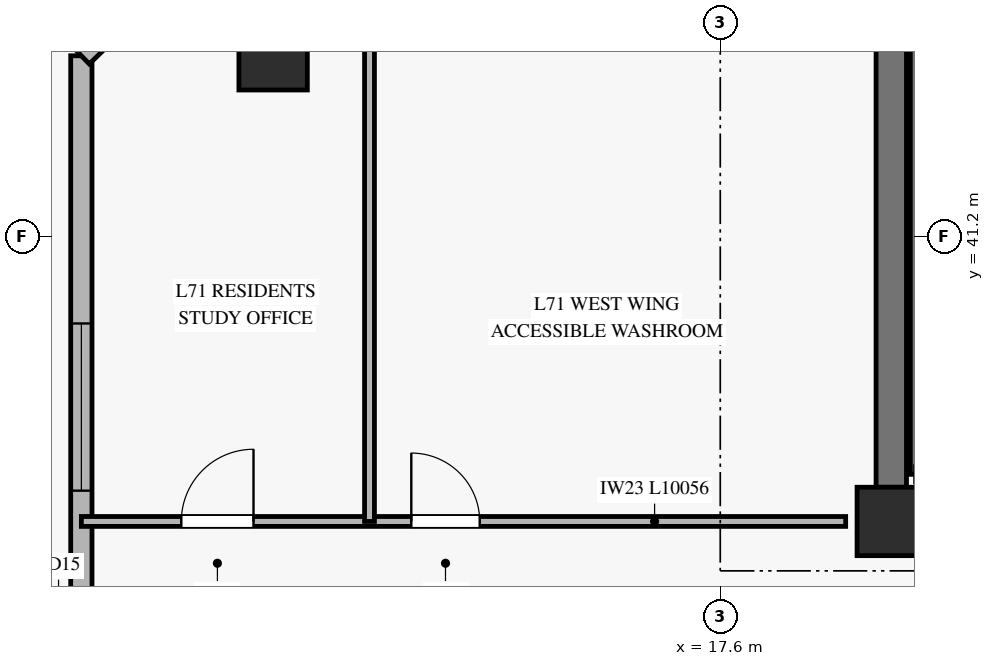
"""IFC4 building model, lengths in metres.
Left out: names, types, materials, properties, quantities, classifications, styles, units other than length and angle.
Written with IfcOpenShell. Run it as: python <this file> out.ifc"""

import sys

from ifc_helpers import new_model, si_unit, direction, frame, frame_2d, origin, origin_2d, place, context, subcontext, project, spatial, rectangle, hollow_rectangle, extrude, source, transform, mapped, element, fill, save


model = new_model("IFC4")
c1 = context("Model", 3, precision=1e-05, world=origin(), true_north=direction((0.0, 1.0)))
c2 = subcontext(c1, "Body", "Model", "MODEL_VIEW")
j1 = project(units=[si_unit("LENGTHUNIT", "METRE"), si_unit("PLANEANGLEUNIT", "RADIAN")], contexts=[c1])
p1 = place(None, origin())
s1 = spatial("IfcSite", under=j1, at=p1, CompositionType="ELEMENT")
p2 = place(p1, origin())
s2 = spatial("IfcBuilding", under=s1, at=p2, CompositionType="ELEMENT")
p3 = place(p2, frame((0.0, 0.0, 275.7)))
s3 = spatial("IfcBuildingStorey", under=s2, at=p3, CompositionType="ELEMENT", Elevation=275.7)
m1 = source(origin(), c2, "Body", "SweptSolid", [
    extrude(rectangle(XDim=0.9, YDim=0.9, at=origin_2d()), origin(), (0.0, 0.0, 1.0), 3.14),
])
p4 = place(p3, frame((19.85, 37.45, 0.0), z_axis=(0.0, 0.0, 1.0), x_axis=(1.0, 0.0, 0.0)))
e1 = element("IfcColumn", 1, at=p4, inside=s3, PredefinedType="PILASTER", context=c2, shape_type="MappedRepresentation", body=[
    mapped(m1, transform((0.0, 0.0, 0.0), x_axis=(1.0, 0.0, 0.0), y_axis=(0.0, 1.0, 0.0), z_axis=(0.0, 0.0, 1.0), scale=1.0)),
])
p5 = place(p3, frame((19.85, 37.9, 0.0), z_axis=(0.0, 0.0, 1.0), x_axis=(0.0, 1.0, 0.0)))
e2 = element("IfcWall", 2, at=p5, inside=s3, PredefinedType="SHEAR", context=c2, shape_type="SweptSolid", body=[
    extrude(rectangle(XDim=8.2, YDim=0.4, at=frame_2d((4.1, 0.0))), origin(), (0.0, 0.0, 1.0), 3.14),
])
m2 = source(origin(), c2, "Body", "SweptSolid", [
    extrude(hollow_rectangle(XDim=0.9, YDim=0.9, WallThickness=0.04, at=origin_2d()), origin(), (0.0, 0.0, 1.0), 3.162),
])
p6 = place(p3, frame((11.717, 43.577, 0.0), z_axis=(0.1166635759, 0.01428376012, 0.993068771161), x_axis=(-0.121527982197, 0.992588005944, 0.0)))
e3 = element("IfcColumn", 3, at=p6, inside=s3, PredefinedType="COLUMN", context=c2, shape_type="MappedRepresentation", body=[
    mapped(m2, transform((0.0, 0.0, 0.0), x_axis=(1.0, 0.0, 0.0), y_axis=(0.0, 1.0, 0.0), z_axis=(0.0, 0.0, 1.0), scale=1.0)),
])
p7 = place(p3, frame((9.194, 31.763, 0.0), z_axis=(0.0, 0.0, 1.0), x_axis=(0.0, 1.0, 0.0)))
e4 = element("IfcWall", 4, at=p7, inside=s3, PredefinedType="SOLIDWALL", context=c2, shape_type="SweptSolid", body=[
    extrude(rectangle(XDim=11.814, YDim=0.28, at=frame_2d((5.907, 0.0))), origin(), (0.0, 0.0, 1.0), 2.77),
])
p8 = place(p7, frame((6.092, 0.0, 0.45)))
e5 = element("IfcOpeningElement", 5, at=p8, cuts=e4, PredefinedType="OPENING", context=c2, shape_type="SweptSolid", body=[
    extrude(rectangle(XDim=2.2, YDim=2.1, at=frame_2d((1.1, 1.05))), frame((0.0, 0.15, 0.0), z_axis=(0.0, -1.0, 0.0), x_axis=(1.0, 0.0, 0.0)), (0.0, 0.0, 1.0), 0.3),
])
p9 = place(p3, frame((11.942, 46.25, 0.0), z_axis=(0.0, 0.0, 1.0), x_axis=(-0.716783568283, -0.697295716493, 0.0)))
e6 = element("IfcWall", 6, at=p9, inside=s3, PredefinedType="SOLIDWALL", context=c2, shape_type="SweptSolid", body=[
    extrude(rectangle(XDim=3.833, YDim=0.3, at=frame_2d((1.917, 0.0))), origin(), (0.0, 0.0, 1.0), 2.77),
])
p10 = place(p9, frame((1.117, 0.0, 0.45)))
e7 = element("IfcOpeningElement", 7, at=p10, cuts=e6, PredefinedType="OPENING", context=c2, shape_type="SweptSolid", body=[
    extrude(rectangle(XDim=1.6, YDim=2.0, at=frame_2d((0.8, 1.0))), frame((0.0, 0.16, 0.0), z_axis=(0.0, -1.0, 0.0), x_axis=(1.0, 0.0, 0.0)), (0.0, 0.0, 1.0), 0.32),
])
p11 = place(p3, frame((20.17, 38.07, 0.0), z_axis=(0.0, 0.0, 1.0), x_axis=(0.0, 1.0, 0.0)))
e8 = element("IfcWall", 8, at=p11, inside=s3, PredefinedType="SOLIDWALL", context=c2, shape_type="SweptSolid", body=[
    extrude(rectangle(XDim=7.25, YDim=0.14, at=frame_2d((3.625, 0.0))), origin(), (0.0, 0.0, 1.0), 3.4),
])
p12 = place(p3, frame((9.194, 37.45, 0.0), z_axis=(0.0, 0.0, 1.0), x_axis=(1.0, 0.0, 0.0)))
e9 = element("IfcWall", 9, at=p12, inside=s3, PredefinedType="PARTITIONING", context=c2, shape_type="SweptSolid", body=[
    extrude(rectangle(XDim=10.056, YDim=0.13, at=frame_2d((5.028, 0.0))), origin(), (0.0, 0.0, 1.0), 2.775),
])
p13 = place(p12, frame((1.315, 0.0, 0.0)))
e10 = element("IfcOpeningElement", 10, at=p13, cuts=e9, PredefinedType="OPENING", context=c2, shape_type="SweptSolid", body=[
    extrude(rectangle(XDim=0.95, YDim=2.1, at=frame_2d((0.475, 1.05))), frame((0.0, 0.075, 0.0), z_axis=(0.0, -1.0, 0.0), x_axis=(1.0, 0.0, 0.0)), (0.0, 0.0, 1.0), 0.15),
])
p14 = place(p12, frame((4.341, 0.0, 0.0)))
e11 = element("IfcOpeningElement", 11, at=p14, cuts=e9, PredefinedType="OPENING", context=c2, shape_type="SweptSolid", body=[
    extrude(rectangle(XDim=0.9, YDim=2.1, at=frame_2d((0.45, 1.05))), frame((0.0, 0.075, 0.0), z_axis=(0.0, -1.0, 0.0), x_axis=(1.0, 0.0, 0.0)), (0.0, 0.0, 1.0), 0.15),
])
p15 = place(p3, frame((12.985, 37.45, 0.0), z_axis=(0.0, 0.0, 1.0), x_axis=(0.0, 1.0, 0.0)))
e12 = element("IfcWall", 12, at=p15, inside=s3, PredefinedType="PARTITIONING", context=c2, shape_type="SweptSolid", body=[
    extrude(rectangle(XDim=8.8, YDim=0.13, at=frame_2d((4.4, 0.0))), origin(), (0.0, 0.0, 1.0), 3.14),
])
m3 = source(origin(), c2, "Body", "SweptSolid", [
    extrude(rectangle(XDim=2.2, YDim=2.1, at=frame_2d((1.1, 1.05))), frame((0.0, 0.03, 0.0), z_axis=(0.0, -1.0, 0.0), x_axis=(1.0, 0.0, 0.0)), (0.0, 0.0, 1.0), 0.06),
])
p16 = place(p8, origin())
e13 = element("IfcWindow", 13, at=p16, inside=s3, PartitioningType="SINGLE_PANEL", PredefinedType="WINDOW", context=c2, shape_type="MappedRepresentation", body=[
    mapped(m3, transform((0.0, 0.0, 0.0), x_axis=(1.0, 0.0, 0.0), y_axis=(0.0, 1.0, 0.0), z_axis=(0.0, 0.0, 1.0), scale=1.0)),
])
fill(e5, e13)
m4 = source(origin(), c2, "Body", "SweptSolid", [
    extrude(rectangle(XDim=0.95, YDim=2.1, at=frame_2d((0.475, 1.05))), frame((0.0, 0.025, 0.0), z_axis=(0.0, -1.0, 0.0), x_axis=(1.0, 0.0, 0.0)), (0.0, 0.0, 1.0), 0.05),
])
p17 = place(p13, origin())
e14 = element("IfcDoor", 14, at=p17, inside=s3, OperationType="SINGLE_SWING_RIGHT", PredefinedType="DOOR", context=c2, shape_type="MappedRepresentation", body=[
    mapped(m4, transform((0.0, 0.0, 0.0), x_axis=(1.0, 0.0, 0.0), y_axis=(0.0, 1.0, 0.0), z_axis=(0.0, 0.0, 1.0), scale=1.0)),
])
fill(e10, e14)
m5 = source(origin(), c2, "Body", "SweptSolid", [
    extrude(rectangle(XDim=0.9, YDim=2.1, at=frame_2d((0.45, 1.05))), frame((0.0, 0.025, 0.0), z_axis=(0.0, -1.0, 0.0), x_axis=(1.0, 0.0, 0.0)), (0.0, 0.0, 1.0), 0.05),
])
p18 = place(p14, origin())
e15 = element("IfcDoor", 15, at=p18, inside=s3, OperationType="SINGLE_SWING_LEFT", PredefinedType="DOOR", context=c2, shape_type="MappedRepresentation", body=[
    mapped(m5, transform((0.0, 0.0, 0.0), x_axis=(1.0, 0.0, 0.0), y_axis=(0.0, 1.0, 0.0), z_axis=(0.0, 0.0, 1.0), scale=1.0)),
])
fill(e11, e15)
save(model, sys.argv[1])
